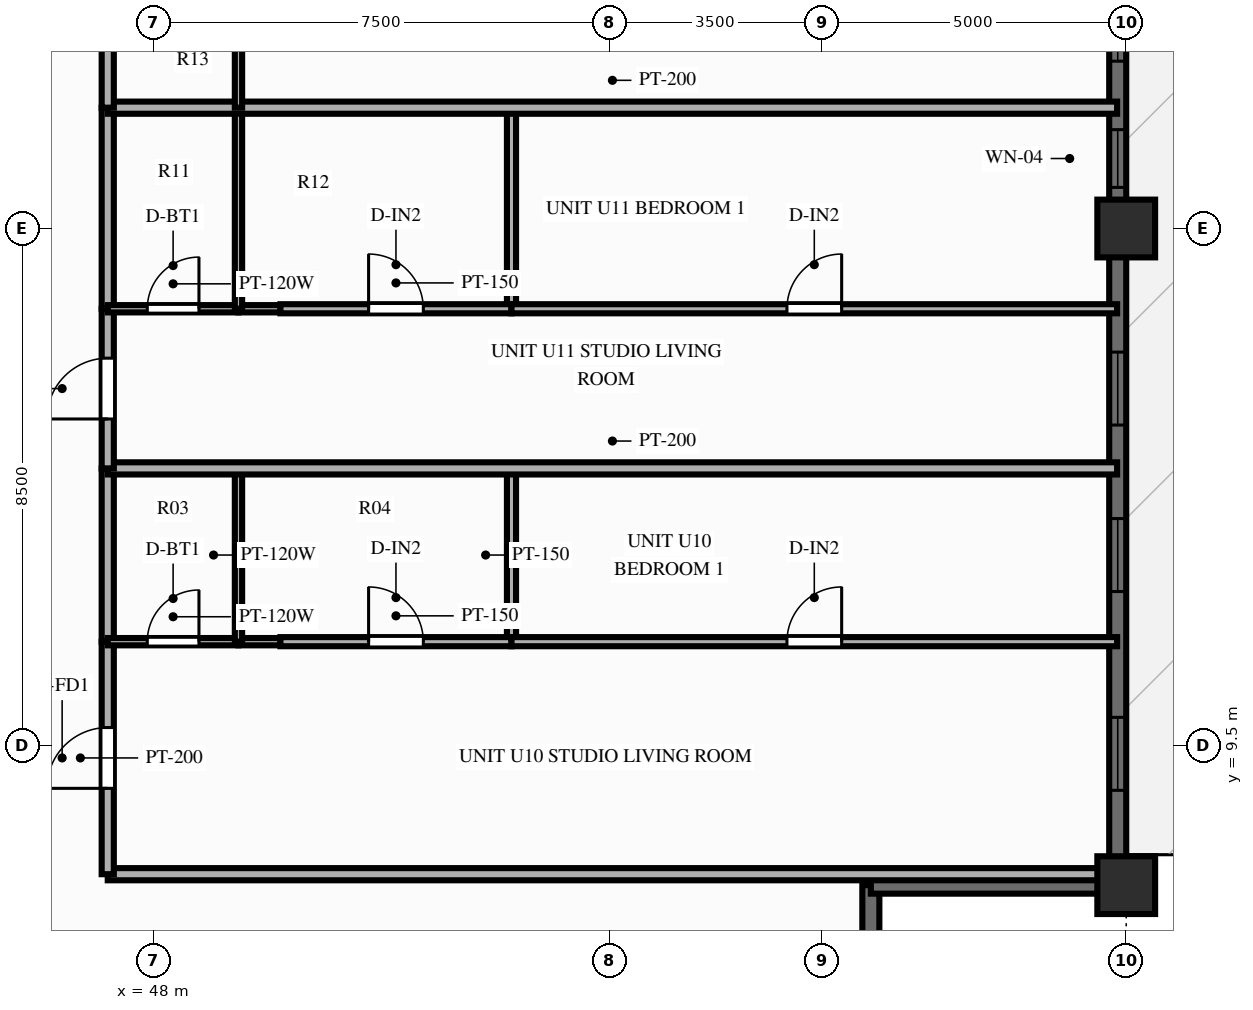
"""IFC4 building model, lengths in metres.
Left out: names, types, materials, properties, quantities, classifications, styles, units other than length and angle.
Written with IfcOpenShell. Run it as: python <this file> out.ifc"""

import sys

from ifc_helpers import new_model, si_unit, direction, frame, frame_2d, origin, origin_2d, place, context, subcontext, project, spatial, rectangle, extrude, source, transform, mapped, element, fill, save


model = new_model("IFC4")
c1 = context("Model", 3, precision=1e-05, world=origin(), true_north=direction((0.0, 1.0)))
c2 = subcontext(c1, "Body", "Model", "MODEL_VIEW")
j1 = project(units=[si_unit("LENGTHUNIT", "METRE"), si_unit("PLANEANGLEUNIT", "RADIAN")], contexts=[c1])
p1 = place(None, origin())
s1 = spatial("IfcSite", under=j1, at=p1, CompositionType="ELEMENT")
p2 = place(p1, origin())
s2 = spatial("IfcBuilding", under=s1, at=p2, CompositionType="ELEMENT")
p3 = place(p2, frame((0.0, 0.0, 113.85)))
s3 = spatial("IfcBuildingStorey", under=s2, at=p3, CompositionType="ELEMENT", Elevation=113.85)
m1 = source(origin(), c2, "Body", "SweptSolid", [
    extrude(rectangle(XDim=0.95, YDim=0.95, at=origin_2d()), origin(), (0.0, 0.0, 1.0), 3.0),
])
for number, where, z_axis, x_axis in (
    (1, (64.0, 7.2, 0.0), (0.0, 0.0, 1.0), (1.0, 0.0, 0.0)),
    (2, (64.0, 18.0, 0.0), (0.0, 0.0, 1.0), (1.0, 0.0, 0.0)),
):
    element("IfcColumn", number, at=place(p3, frame(where, z_axis=z_axis, x_axis=x_axis)), inside=s3, PredefinedType="COLUMN", context=c2, shape_type="MappedRepresentation", body=[
        mapped(m1, transform((0.0, 0.0, 0.0), scale=1.0)),
    ])
p4 = place(p3, frame((63.86, 7.2, 0.0), z_axis=(0.0, 0.0, 1.0), x_axis=(0.0, 1.0, 0.0)))
e3 = element("IfcWall", 3, at=p4, inside=s3, PredefinedType="SOLIDWALL", context=c2, shape_type="SweptSolid", body=[
    extrude(rectangle(XDim=39.6, YDim=0.28, at=frame_2d((19.8, 0.0))), origin(), (0.0, 0.0, 1.0), 2.28),
])
p5 = place(p4, frame((1.56, 0.0, 0.25)))
e4 = element("IfcOpeningElement", 4, at=p5, cuts=e3, PredefinedType="OPENING", context=c2, shape_type="SweptSolid", body=[
    extrude(rectangle(XDim=1.2, YDim=1.5, at=frame_2d((0.6, 0.75))), frame((0.0, 0.152, 0.0), z_axis=(0.0, -1.0, 0.0), x_axis=(1.0, 0.0, 0.0)), (0.0, 0.0, 1.0), 0.304),
])
p6 = place(p4, frame((4.829, 0.0, 0.25)))
e5 = element("IfcOpeningElement", 5, at=p6, cuts=e3, PredefinedType="OPENING", context=c2, shape_type="SweptSolid", body=[
    extrude(rectangle(XDim=1.2, YDim=1.5, at=frame_2d((0.6, 0.75))), frame((0.0, 0.152, 0.0), z_axis=(0.0, -1.0, 0.0), x_axis=(1.0, 0.0, 0.0)), (0.0, 0.0, 1.0), 0.304),
])
p7 = place(p4, frame((7.567, 0.0, 0.25)))
e6 = element("IfcOpeningElement", 6, at=p7, cuts=e3, PredefinedType="OPENING", context=c2, shape_type="SweptSolid", body=[
    extrude(rectangle(XDim=1.2, YDim=1.5, at=frame_2d((0.6, 0.75))), frame((0.0, 0.152, 0.0), z_axis=(0.0, -1.0, 0.0), x_axis=(1.0, 0.0, 0.0)), (0.0, 0.0, 1.0), 0.304),
])
p8 = place(p4, frame((11.476, 0.0, 0.25)))
e7 = element("IfcOpeningElement", 7, at=p8, cuts=e3, PredefinedType="OPENING", context=c2, shape_type="SweptSolid", body=[
    extrude(rectangle(XDim=0.95, YDim=1.5, at=frame_2d((0.475, 0.75))), frame((0.0, 0.152, 0.0), z_axis=(0.0, -1.0, 0.0), x_axis=(1.0, 0.0, 0.0)), (0.0, 0.0, 1.0), 0.304),
])
p9 = place(p4, frame((13.552, 0.0, 0.25)))
e8 = element("IfcOpeningElement", 8, at=p9, cuts=e3, PredefinedType="OPENING", context=c2, shape_type="SweptSolid", body=[
    extrude(rectangle(XDim=1.2, YDim=1.5, at=frame_2d((0.6, 0.75))), frame((0.0, 0.152, 0.0), z_axis=(0.0, -1.0, 0.0), x_axis=(1.0, 0.0, 0.0)), (0.0, 0.0, 1.0), 0.304),
])
p10 = place(p4, frame((16.518, 0.0, 0.25)))
e9 = element("IfcOpeningElement", 9, at=p10, cuts=e3, PredefinedType="OPENING", context=c2, shape_type="SweptSolid", body=[
    extrude(rectangle(XDim=1.2, YDim=1.5, at=frame_2d((0.6, 0.75))), frame((0.0, 0.152, 0.0), z_axis=(0.0, -1.0, 0.0), x_axis=(1.0, 0.0, 0.0)), (0.0, 0.0, 1.0), 0.304),
])
p11 = place(p4, frame((19.2, 0.0, 0.25)))
e10 = element("IfcOpeningElement", 10, at=p11, cuts=e3, PredefinedType="OPENING", context=c2, shape_type="SweptSolid", body=[
    extrude(rectangle(XDim=1.2, YDim=1.5, at=frame_2d((0.6, 0.75))), frame((0.0, 0.152, 0.0), z_axis=(0.0, -1.0, 0.0), x_axis=(1.0, 0.0, 0.0)), (0.0, 0.0, 1.0), 0.304),
])
p12 = place(p4, frame((21.578, 0.0, 0.25)))
e11 = element("IfcOpeningElement", 11, at=p12, cuts=e3, PredefinedType="OPENING", context=c2, shape_type="SweptSolid", body=[
    extrude(rectangle(XDim=1.2, YDim=1.5, at=frame_2d((0.6, 0.75))), frame((0.0, 0.152, 0.0), z_axis=(0.0, -1.0, 0.0), x_axis=(1.0, 0.0, 0.0)), (0.0, 0.0, 1.0), 0.304),
])
p13 = place(p4, frame((26.313, 0.0, 0.0), z_axis=(0.0, 0.0, 1.0), x_axis=(-1.0, 0.0, 0.0)))
e12 = element("IfcOpeningElement", 12, at=p13, cuts=e3, PredefinedType="OPENING", context=c2, shape_type="SweptSolid", body=[
    extrude(rectangle(XDim=1.6, YDim=2.15, at=frame_2d((0.8, 1.075))), frame((0.0, 0.152, 0.0), z_axis=(0.0, -1.0, 0.0), x_axis=(1.0, 0.0, 0.0)), (0.0, 0.0, 1.0), 0.304),
])
p14 = place(p4, frame((29.305, 0.0, 0.25)))
e13 = element("IfcOpeningElement", 13, at=p14, cuts=e3, PredefinedType="OPENING", context=c2, shape_type="SweptSolid", body=[
    extrude(rectangle(XDim=0.7, YDim=1.5, at=frame_2d((0.35, 0.75))), frame((0.0, 0.152, 0.0), z_axis=(0.0, -1.0, 0.0), x_axis=(1.0, 0.0, 0.0)), (0.0, 0.0, 1.0), 0.304),
])
p15 = place(p4, frame((30.848, 0.0, 0.25)))
e14 = element("IfcOpeningElement", 14, at=p15, cuts=e3, PredefinedType="OPENING", context=c2, shape_type="SweptSolid", body=[
    extrude(rectangle(XDim=1.2, YDim=1.5, at=frame_2d((0.6, 0.75))), frame((0.0, 0.152, 0.0), z_axis=(0.0, -1.0, 0.0), x_axis=(1.0, 0.0, 0.0)), (0.0, 0.0, 1.0), 0.304),
])
p16 = place(p4, frame((34.183, 0.0, 0.25)))
e15 = element("IfcOpeningElement", 15, at=p16, cuts=e3, PredefinedType="OPENING", context=c2, shape_type="SweptSolid", body=[
    extrude(rectangle(XDim=1.2, YDim=1.5, at=frame_2d((0.6, 0.75))), frame((0.0, 0.152, 0.0), z_axis=(0.0, -1.0, 0.0), x_axis=(1.0, 0.0, 0.0)), (0.0, 0.0, 1.0), 0.304),
])
p17 = place(p4, frame((37.452, 0.0, 0.25)))
e16 = element("IfcOpeningElement", 16, at=p17, cuts=e3, PredefinedType="OPENING", context=c2, shape_type="SweptSolid", body=[
    extrude(rectangle(XDim=1.2, YDim=1.5, at=frame_2d((0.6, 0.75))), frame((0.0, 0.152, 0.0), z_axis=(0.0, -1.0, 0.0), x_axis=(1.0, 0.0, 0.0)), (0.0, 0.0, 1.0), 0.304),
])
for number, where, z_axis, x_axis in (
    (17, (59.8, 3.08, 0.0), (0.0, 0.0, 1.0), (0.0, 1.0, 0.0)),
    (18, (59.8, 7.2, 0.0), (0.0, 0.0, 1.0), (1.0, 0.0, 0.0)),
):
    element("IfcWall", number, at=place(p3, frame(where, z_axis=z_axis, x_axis=x_axis)), inside=s3, PredefinedType="SOLIDWALL", context=c2, shape_type="SweptSolid", body=[
        extrude(rectangle(XDim=4.12, YDim=0.28, at=frame_2d((2.06, 0.0))), origin(), (0.0, 0.0, 1.0), 2.28),
    ])
p18 = place(p3, frame((47.25, 7.38, 0.0), z_axis=(0.0, 0.0, 1.0), x_axis=(1.0, 0.0, 0.0)))
e19 = element("IfcWall", 19, at=p18, inside=s3, PredefinedType="PARTITIONING", context=c2, shape_type="SweptSolid", body=[
    extrude(rectangle(XDim=16.6, YDim=0.2, at=frame_2d((8.3, 0.0))), origin(), (0.0, 0.0, 1.0), 2.79),
])
p19 = place(p3, frame((47.25, 7.38, 0.0), z_axis=(0.0, 0.0, 1.0), x_axis=(0.0, 1.0, 0.0)))
e20 = element("IfcWall", 20, at=p19, inside=s3, PredefinedType="PARTITIONING", context=c2, shape_type="SweptSolid", body=[
    extrude(rectangle(XDim=3.824, YDim=0.2, at=frame_2d((1.912, 0.0))), origin(), (0.0, 0.0, 1.0), 2.79),
])
p20 = place(p19, frame((1.412, 0.0, 0.0)))
e21 = element("IfcOpeningElement", 21, at=p20, cuts=e20, PredefinedType="OPENING", context=c2, shape_type="SweptSolid", body=[
    extrude(rectangle(XDim=1.0, YDim=2.15, at=frame_2d((0.5, 1.075))), frame((0.0, 0.112, 0.0), z_axis=(0.0, -1.0, 0.0), x_axis=(1.0, 0.0, 0.0)), (0.0, 0.0, 1.0), 0.224),
])
p21 = place(p3, frame((47.25, 11.204, 0.0), z_axis=(0.0, 0.0, 1.0), x_axis=(0.0, 1.0, 0.0)))
e22 = element("IfcWall", 22, at=p21, inside=s3, PredefinedType="PARTITIONING", context=c2, shape_type="SweptSolid", body=[
    extrude(rectangle(XDim=2.85, YDim=0.2, at=frame_2d((1.425, 0.0))), origin(), (0.0, 0.0, 1.0), 2.79),
])
p22 = place(p3, frame((47.25, 11.204, 0.0), z_axis=(0.0, 0.0, 1.0), x_axis=(1.0, 0.0, 0.0)))
e23 = element("IfcWall", 23, at=p22, inside=s3, PredefinedType="PARTITIONING", context=c2, shape_type="SweptSolid", body=[
    extrude(rectangle(XDim=2.15, YDim=0.12, at=frame_2d((1.075, 0.0))), origin(), (0.0, 0.0, 1.0), 2.79),
])
p23 = place(p22, frame((0.65, 0.0, 0.0)))
e24 = element("IfcOpeningElement", 24, at=p23, cuts=e23, PredefinedType="OPENING", context=c2, shape_type="SweptSolid", body=[
    extrude(rectangle(XDim=0.85, YDim=2.05, at=frame_2d((0.425, 1.025))), frame((0.0, 0.072, 0.0), z_axis=(0.0, -1.0, 0.0), x_axis=(1.0, 0.0, 0.0)), (0.0, 0.0, 1.0), 0.144),
])
p24 = place(p3, frame((49.4, 11.204, 0.0), z_axis=(0.0, 0.0, 1.0), x_axis=(1.0, 0.0, 0.0)))
e25 = element("IfcWall", 25, at=p24, inside=s3, PredefinedType="PARTITIONING", context=c2, shape_type="SweptSolid", body=[
    extrude(rectangle(XDim=0.69, YDim=0.12, at=frame_2d((0.345, 0.0))), origin(), (0.0, 0.0, 1.0), 2.79),
])
p25 = place(p3, frame((49.4, 11.204, 0.0), z_axis=(0.0, 0.0, 1.0), x_axis=(0.0, 1.0, 0.0)))
e26 = element("IfcWall", 26, at=p25, inside=s3, PredefinedType="PARTITIONING", context=c2, shape_type="SweptSolid", body=[
    extrude(rectangle(XDim=2.85, YDim=0.12, at=frame_2d((1.425, 0.0))), origin(), (0.0, 0.0, 1.0), 2.79),
])
p26 = place(p3, frame((53.89, 11.204, 0.0), z_axis=(0.0, 0.0, 1.0), x_axis=(0.0, 1.0, 0.0)))
e27 = element("IfcWall", 27, at=p26, inside=s3, PredefinedType="PARTITIONING", context=c2, shape_type="SweptSolid", body=[
    extrude(rectangle(XDim=2.85, YDim=0.15, at=frame_2d((1.425, 0.0))), origin(), (0.0, 0.0, 1.0), 2.79),
])
p27 = place(p3, frame((50.09, 11.204, 0.0), z_axis=(0.0, 0.0, 1.0), x_axis=(1.0, 0.0, 0.0)))
e28 = element("IfcWall", 28, at=p27, inside=s3, PredefinedType="PARTITIONING", context=c2, shape_type="SweptSolid", body=[
    extrude(rectangle(XDim=3.8, YDim=0.15, at=frame_2d((1.9, 0.0))), origin(), (0.0, 0.0, 1.0), 2.79),
])
p28 = place(p27, frame((1.45, 0.0, 0.0)))
e29 = element("IfcOpeningElement", 29, at=p28, cuts=e28, PredefinedType="OPENING", context=c2, shape_type="SweptSolid", body=[
    extrude(rectangle(XDim=0.9, YDim=2.1, at=frame_2d((0.45, 1.05))), frame((0.0, 0.087, 0.0), z_axis=(0.0, -1.0, 0.0), x_axis=(1.0, 0.0, 0.0)), (0.0, 0.0, 1.0), 0.174),
])
p29 = place(p3, frame((53.89, 11.204, 0.0), z_axis=(0.0, 0.0, 1.0), x_axis=(1.0, 0.0, 0.0)))
e30 = element("IfcWall", 30, at=p29, inside=s3, PredefinedType="PARTITIONING", context=c2, shape_type="SweptSolid", body=[
    extrude(rectangle(XDim=9.96, YDim=0.15, at=frame_2d((4.98, 0.0))), origin(), (0.0, 0.0, 1.0), 2.79),
])
p30 = place(p29, frame((4.53, 0.0, 0.0)))
e31 = element("IfcOpeningElement", 31, at=p30, cuts=e30, PredefinedType="OPENING", context=c2, shape_type="SweptSolid", body=[
    extrude(rectangle(XDim=0.9, YDim=2.1, at=frame_2d((0.45, 1.05))), frame((0.0, 0.087, 0.0), z_axis=(0.0, -1.0, 0.0), x_axis=(1.0, 0.0, 0.0)), (0.0, 0.0, 1.0), 0.174),
])
p31 = place(p3, frame((47.25, 14.054, 0.0), z_axis=(0.0, 0.0, 1.0), x_axis=(1.0, 0.0, 0.0)))
e32 = element("IfcWall", 32, at=p31, inside=s3, PredefinedType="PARTITIONING", context=c2, shape_type="SweptSolid", body=[
    extrude(rectangle(XDim=16.6, YDim=0.2, at=frame_2d((8.3, 0.0))), origin(), (0.0, 0.0, 1.0), 2.79),
])
p32 = place(p3, frame((47.25, 14.054, 0.0), z_axis=(0.0, 0.0, 1.0), x_axis=(0.0, 1.0, 0.0)))
e33 = element("IfcWall", 33, at=p32, inside=s3, PredefinedType="PARTITIONING", context=c2, shape_type="SweptSolid", body=[
    extrude(rectangle(XDim=2.625, YDim=0.2, at=frame_2d((1.313, 0.0))), origin(), (0.0, 0.0, 1.0), 2.79),
])
p33 = place(p32, frame((0.813, 0.0, 0.0)))
e34 = element("IfcOpeningElement", 34, at=p33, cuts=e33, PredefinedType="OPENING", context=c2, shape_type="SweptSolid", body=[
    extrude(rectangle(XDim=1.0, YDim=2.15, at=frame_2d((0.5, 1.075))), frame((0.0, 0.112, 0.0), z_axis=(0.0, -1.0, 0.0), x_axis=(1.0, 0.0, 0.0)), (0.0, 0.0, 1.0), 0.224),
])
p34 = place(p3, frame((47.25, 16.68, 0.0), z_axis=(0.0, 0.0, 1.0), x_axis=(0.0, 1.0, 0.0)))
e35 = element("IfcWall", 35, at=p34, inside=s3, PredefinedType="PARTITIONING", context=c2, shape_type="SweptSolid", body=[
    extrude(rectangle(XDim=3.307, YDim=0.2, at=frame_2d((1.654, 0.0))), origin(), (0.0, 0.0, 1.0), 2.79),
])
p35 = place(p3, frame((47.25, 16.68, 0.0), z_axis=(0.0, 0.0, 1.0), x_axis=(1.0, 0.0, 0.0)))
e36 = element("IfcWall", 36, at=p35, inside=s3, PredefinedType="PARTITIONING", context=c2, shape_type="SweptSolid", body=[
    extrude(rectangle(XDim=2.15, YDim=0.12, at=frame_2d((1.075, 0.0))), origin(), (0.0, 0.0, 1.0), 2.79),
])
p36 = place(p35, frame((0.65, 0.0, 0.0)))
e37 = element("IfcOpeningElement", 37, at=p36, cuts=e36, PredefinedType="OPENING", context=c2, shape_type="SweptSolid", body=[
    extrude(rectangle(XDim=0.85, YDim=2.05, at=frame_2d((0.425, 1.025))), frame((0.0, 0.072, 0.0), z_axis=(0.0, -1.0, 0.0), x_axis=(1.0, 0.0, 0.0)), (0.0, 0.0, 1.0), 0.144),
])
p37 = place(p3, frame((49.4, 16.68, 0.0), z_axis=(0.0, 0.0, 1.0), x_axis=(1.0, 0.0, 0.0)))
e38 = element("IfcWall", 38, at=p37, inside=s3, PredefinedType="PARTITIONING", context=c2, shape_type="SweptSolid", body=[
    extrude(rectangle(XDim=0.69, YDim=0.12, at=frame_2d((0.345, 0.0))), origin(), (0.0, 0.0, 1.0), 2.79),
])
p38 = place(p3, frame((49.4, 16.68, 0.0), z_axis=(0.0, 0.0, 1.0), x_axis=(0.0, 1.0, 0.0)))
e39 = element("IfcWall", 39, at=p38, inside=s3, PredefinedType="PARTITIONING", context=c2, shape_type="SweptSolid", body=[
    extrude(rectangle(XDim=3.307, YDim=0.12, at=frame_2d((1.654, 0.0))), origin(), (0.0, 0.0, 1.0), 2.79),
])
p39 = place(p3, frame((53.89, 16.68, 0.0), z_axis=(0.0, 0.0, 1.0), x_axis=(0.0, 1.0, 0.0)))
e40 = element("IfcWall", 40, at=p39, inside=s3, PredefinedType="PARTITIONING", context=c2, shape_type="SweptSolid", body=[
    extrude(rectangle(XDim=3.307, YDim=0.15, at=frame_2d((1.654, 0.0))), origin(), (0.0, 0.0, 1.0), 2.79),
])
p40 = place(p3, frame((50.09, 16.68, 0.0), z_axis=(0.0, 0.0, 1.0), x_axis=(1.0, 0.0, 0.0)))
e41 = element("IfcWall", 41, at=p40, inside=s3, PredefinedType="PARTITIONING", context=c2, shape_type="SweptSolid", body=[
    extrude(rectangle(XDim=3.8, YDim=0.15, at=frame_2d((1.9, 0.0))), origin(), (0.0, 0.0, 1.0), 2.79),
])
p41 = place(p40, frame((1.45, 0.0, 0.0)))
e42 = element("IfcOpeningElement", 42, at=p41, cuts=e41, PredefinedType="OPENING", context=c2, shape_type="SweptSolid", body=[
    extrude(rectangle(XDim=0.9, YDim=2.1, at=frame_2d((0.45, 1.05))), frame((0.0, 0.087, 0.0), z_axis=(0.0, -1.0, 0.0), x_axis=(1.0, 0.0, 0.0)), (0.0, 0.0, 1.0), 0.174),
])
p42 = place(p3, frame((53.89, 16.68, 0.0), z_axis=(0.0, 0.0, 1.0), x_axis=(1.0, 0.0, 0.0)))
e43 = element("IfcWall", 43, at=p42, inside=s3, PredefinedType="PARTITIONING", context=c2, shape_type="SweptSolid", body=[
    extrude(rectangle(XDim=9.96, YDim=0.15, at=frame_2d((4.98, 0.0))), origin(), (0.0, 0.0, 1.0), 2.79),
])
p43 = place(p42, frame((4.53, 0.0, 0.0)))
e44 = element("IfcOpeningElement", 44, at=p43, cuts=e43, PredefinedType="OPENING", context=c2, shape_type="SweptSolid", body=[
    extrude(rectangle(XDim=0.9, YDim=2.1, at=frame_2d((0.45, 1.05))), frame((0.0, 0.087, 0.0), z_axis=(0.0, -1.0, 0.0), x_axis=(1.0, 0.0, 0.0)), (0.0, 0.0, 1.0), 0.174),
])
p44 = place(p3, frame((47.25, 19.987, 0.0), z_axis=(0.0, 0.0, 1.0), x_axis=(1.0, 0.0, 0.0)))
e45 = element("IfcWall", 45, at=p44, inside=s3, PredefinedType="PARTITIONING", context=c2, shape_type="SweptSolid", body=[
    extrude(rectangle(XDim=16.6, YDim=0.2, at=frame_2d((8.3, 0.0))), origin(), (0.0, 0.0, 1.0), 2.79),
])
p45 = place(p3, frame((47.25, 19.987, 0.0), z_axis=(0.0, 0.0, 1.0), x_axis=(0.0, 1.0, 0.0)))
e46 = element("IfcWall", 46, at=p45, inside=s3, PredefinedType="PARTITIONING", context=c2, shape_type="SweptSolid", body=[
    extrude(rectangle(XDim=2.729, YDim=0.2, at=frame_2d((1.365, 0.0))), origin(), (0.0, 0.0, 1.0), 2.79),
])
p46 = place(p3, frame((49.4, 19.987, 0.0), z_axis=(0.0, 0.0, 1.0), x_axis=(0.0, 1.0, 0.0)))
e47 = element("IfcWall", 47, at=p46, inside=s3, PredefinedType="PARTITIONING", context=c2, shape_type="SweptSolid", body=[
    extrude(rectangle(XDim=2.729, YDim=0.12, at=frame_2d((1.365, 0.0))), origin(), (0.0, 0.0, 1.0), 2.79),
])
m2 = source(origin(), c2, "Body", "SweptSolid", [
    extrude(rectangle(XDim=1.2, YDim=1.5, at=frame_2d((0.6, 0.75))), frame((0.0, 0.03, 0.0), z_axis=(0.0, -1.0, 0.0), x_axis=(1.0, 0.0, 0.0)), (0.0, 0.0, 1.0), 0.06),
])
p47 = place(p5, origin())
e48 = element("IfcWindow", 48, at=p47, inside=s3, PartitioningType="SINGLE_PANEL", PredefinedType="WINDOW", context=c2, shape_type="MappedRepresentation", body=[
    mapped(m2, transform((0.0, 0.0, 0.0), scale=1.0)),
])
fill(e4, e48)
p48 = place(p6, origin())
e49 = element("IfcWindow", 49, at=p48, inside=s3, PartitioningType="SINGLE_PANEL", PredefinedType="WINDOW", context=c2, shape_type="MappedRepresentation", body=[
    mapped(m2, transform((0.0, 0.0, 0.0), scale=1.0)),
])
fill(e5, e49)
p49 = place(p7, origin())
e50 = element("IfcWindow", 50, at=p49, inside=s3, PartitioningType="SINGLE_PANEL", PredefinedType="WINDOW", context=c2, shape_type="MappedRepresentation", body=[
    mapped(m2, transform((0.0, 0.0, 0.0), scale=1.0)),
])
fill(e6, e50)
m3 = source(origin(), c2, "Body", "SweptSolid", [
    extrude(rectangle(XDim=0.95, YDim=1.5, at=frame_2d((0.475, 0.75))), frame((0.0, 0.03, 0.0), z_axis=(0.0, -1.0, 0.0), x_axis=(1.0, 0.0, 0.0)), (0.0, 0.0, 1.0), 0.06),
])
p50 = place(p8, origin())
e51 = element("IfcWindow", 51, at=p50, inside=s3, PartitioningType="SINGLE_PANEL", PredefinedType="WINDOW", context=c2, shape_type="MappedRepresentation", body=[
    mapped(m3, transform((0.0, 0.0, 0.0), scale=1.0)),
])
fill(e7, e51)
p51 = place(p9, origin())
e52 = element("IfcWindow", 52, at=p51, inside=s3, PartitioningType="SINGLE_PANEL", PredefinedType="WINDOW", context=c2, shape_type="MappedRepresentation", body=[
    mapped(m2, transform((0.0, 0.0, 0.0), scale=1.0)),
])
fill(e8, e52)
m4 = source(origin(), c2, "Body", "SweptSolid", [
    extrude(rectangle(XDim=1.0, YDim=2.15, at=frame_2d((0.5, 1.075))), frame((0.0, 0.025, 0.0), z_axis=(0.0, -1.0, 0.0), x_axis=(1.0, 0.0, 0.0)), (0.0, 0.0, 1.0), 0.05),
])
p52 = place(p20, origin())
e53 = element("IfcDoor", 53, at=p52, inside=s3, OperationType="SINGLE_SWING_LEFT", PredefinedType="DOOR", context=c2, shape_type="MappedRepresentation", body=[
    mapped(m4, transform((0.0, 0.0, 0.0), scale=1.0)),
])
fill(e21, e53)
m5 = source(origin(), c2, "Body", "SweptSolid", [
    extrude(rectangle(XDim=0.85, YDim=2.05, at=frame_2d((0.425, 1.025))), frame((0.0, 0.025, 0.0), z_axis=(0.0, -1.0, 0.0), x_axis=(1.0, 0.0, 0.0)), (0.0, 0.0, 1.0), 0.05),
])
p53 = place(p23, origin())
e54 = element("IfcDoor", 54, at=p53, inside=s3, OperationType="SINGLE_SWING_RIGHT", PredefinedType="DOOR", context=c2, shape_type="MappedRepresentation", body=[
    mapped(m5, transform((0.0, 0.0, 0.0), scale=1.0)),
])
fill(e24, e54)
m6 = source(origin(), c2, "Body", "SweptSolid", [
    extrude(rectangle(XDim=0.9, YDim=2.1, at=frame_2d((0.45, 1.05))), frame((0.0, 0.025, 0.0), z_axis=(0.0, -1.0, 0.0), x_axis=(1.0, 0.0, 0.0)), (0.0, 0.0, 1.0), 0.05),
])
p54 = place(p28, origin())
e55 = element("IfcDoor", 55, at=p54, inside=s3, OperationType="SINGLE_SWING_LEFT", PredefinedType="DOOR", context=c2, shape_type="MappedRepresentation", body=[
    mapped(m6, transform((0.0, 0.0, 0.0), scale=1.0)),
])
fill(e29, e55)
p55 = place(p30, origin())
e56 = element("IfcDoor", 56, at=p55, inside=s3, OperationType="SINGLE_SWING_RIGHT", PredefinedType="DOOR", context=c2, shape_type="MappedRepresentation", body=[
    mapped(m6, transform((0.0, 0.0, 0.0), scale=1.0)),
])
fill(e31, e56)
p56 = place(p33, origin())
e57 = element("IfcDoor", 57, at=p56, inside=s3, OperationType="SINGLE_SWING_LEFT", PredefinedType="DOOR", context=c2, shape_type="MappedRepresentation", body=[
    mapped(m4, transform((0.0, 0.0, 0.0), scale=1.0)),
])
fill(e34, e57)
p57 = place(p36, origin())
e58 = element("IfcDoor", 58, at=p57, inside=s3, OperationType="SINGLE_SWING_RIGHT", PredefinedType="DOOR", context=c2, shape_type="MappedRepresentation", body=[
    mapped(m5, transform((0.0, 0.0, 0.0), scale=1.0)),
])
fill(e37, e58)
p58 = place(p41, origin())
e59 = element("IfcDoor", 59, at=p58, inside=s3, OperationType="SINGLE_SWING_LEFT", PredefinedType="DOOR", context=c2, shape_type="MappedRepresentation", body=[
    mapped(m6, transform((0.0, 0.0, 0.0), scale=1.0)),
])
fill(e42, e59)
p59 = place(p43, origin())
e60 = element("IfcDoor", 60, at=p59, inside=s3, OperationType="SINGLE_SWING_RIGHT", PredefinedType="DOOR", context=c2, shape_type="MappedRepresentation", body=[
    mapped(m6, transform((0.0, 0.0, 0.0), scale=1.0)),
])
fill(e44, e60)
save(model, sys.argv[1])
